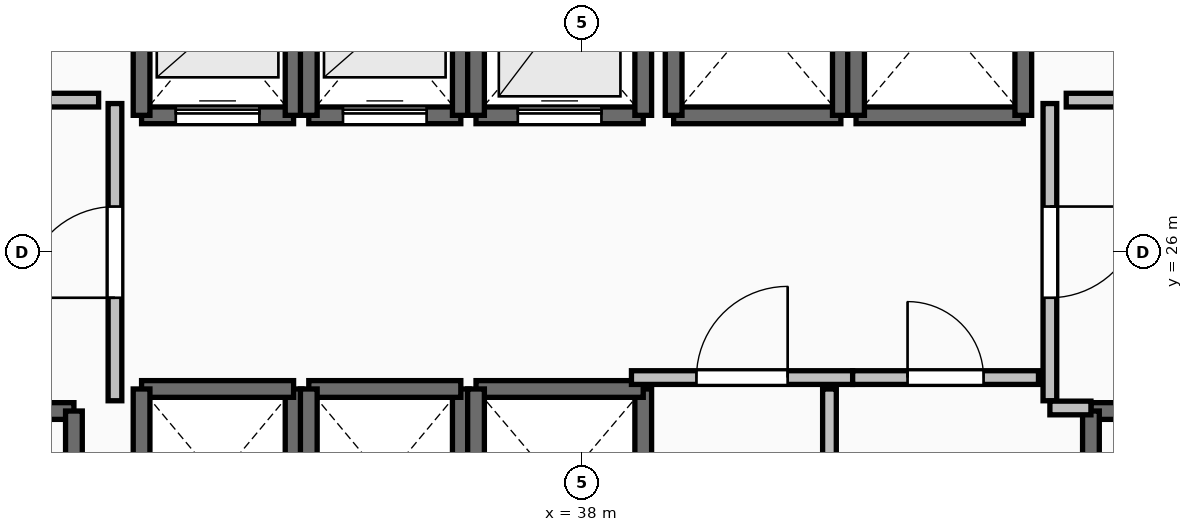
"""IFC4 building model, lengths in metres.
Left out: names, types, materials, properties, quantities, classifications, styles, units other than length and angle.
Written with IfcOpenShell. Run it as: python <this file> out.ifc"""

import sys

from ifc_helpers import new_model, si_unit, direction, frame, frame_2d, origin, place, context, subcontext, project, spatial, rectangle, extrude, element, fill, save


model = new_model("IFC4")
c1 = context("Model", 3, precision=1e-05, world=origin(), true_north=direction((0.0, 1.0)))
c2 = subcontext(c1, "Body", "Model", "MODEL_VIEW")
j1 = project(units=[si_unit("LENGTHUNIT", "METRE"), si_unit("PLANEANGLEUNIT", "RADIAN")], contexts=[c1])
p1 = place(None, origin())
s1 = spatial("IfcSite", under=j1, at=p1, CompositionType="ELEMENT")
p2 = place(p1, origin())
s2 = spatial("IfcBuilding", under=s1, at=p2, CompositionType="ELEMENT")
p3 = place(p2, frame((0.0, 0.0, 9.6)))
s3 = spatial("IfcBuildingStorey", under=s2, at=p3, CompositionType="ELEMENT", Elevation=9.6)
p4 = place(p3, frame((27.94, 23.91, 0.0), z_axis=(0.0, 0.0, 1.0), x_axis=(1.0, 0.0, 0.0)))
e1 = element("IfcWall", 1, at=p4, inside=s3, PredefinedType="SOLIDWALL", context=c2, shape_type="SweptSolid", body=[
    extrude(rectangle(XDim=3.37, YDim=0.22, at=frame_2d((1.685, 0.0))), origin(), (0.0, 0.0, 1.0), 4.48),
])
p5 = place(p4, frame((1.135, 0.0, 0.0)))
e2 = element("IfcOpeningElement", 2, at=p5, cuts=e1, PredefinedType="OPENING", context=c2, shape_type="SweptSolid", body=[
    extrude(rectangle(XDim=1.1, YDim=2.15, at=frame_2d((0.55, 1.075))), frame((0.0, 0.125, 0.0), z_axis=(0.0, -1.0, 0.0), x_axis=(1.0, 0.0, 0.0)), (0.0, 0.0, 1.0), 0.25),
])
p6 = place(p3, frame((31.31, 23.91, 0.0), z_axis=(0.0, 0.0, 1.0), x_axis=(0.0, -1.0, 0.0)))
e3 = element("IfcWall", 3, at=p6, inside=s3, PredefinedType="SOLIDWALL", context=c2, shape_type="SweptSolid", body=[
    extrude(rectangle(XDim=7.42, YDim=0.22, at=frame_2d((3.71, 0.0))), origin(), (0.0, 0.0, 1.0), 4.48),
])
p7 = place(p3, frame((44.69, 23.91, 0.0), z_axis=(0.0, 0.0, 1.0), x_axis=(1.0, 0.0, 0.0)))
e4 = element("IfcWall", 4, at=p7, inside=s3, PredefinedType="SOLIDWALL", context=c2, shape_type="SweptSolid", body=[
    extrude(rectangle(XDim=3.37, YDim=0.22, at=frame_2d((1.685, 0.0))), origin(), (0.0, 0.0, 1.0), 4.48),
])
p8 = place(p7, frame((1.135, 0.0, 0.0)))
e5 = element("IfcOpeningElement", 5, at=p8, cuts=e4, PredefinedType="OPENING", context=c2, shape_type="SweptSolid", body=[
    extrude(rectangle(XDim=1.1, YDim=2.15, at=frame_2d((0.55, 1.075))), frame((0.0, 0.125, 0.0), z_axis=(0.0, -1.0, 0.0), x_axis=(1.0, 0.0, 0.0)), (0.0, 0.0, 1.0), 0.25),
])
p9 = place(p3, frame((44.69, 16.49, 0.0), z_axis=(0.0, 0.0, 1.0), x_axis=(0.0, 1.0, 0.0)))
e6 = element("IfcWall", 6, at=p9, inside=s3, PredefinedType="SOLIDWALL", context=c2, shape_type="SweptSolid", body=[
    extrude(rectangle(XDim=7.42, YDim=0.22, at=frame_2d((3.71, 0.0))), origin(), (0.0, 0.0, 1.0), 4.48),
])
p10 = place(p3, frame((32.2, 27.8, 0.0), z_axis=(0.0, 0.0, 1.0), x_axis=(1.0, 0.0, 0.0)))
e7 = element("IfcWall", 7, at=p10, inside=s3, PredefinedType="SOLIDWALL", context=c2, shape_type="SweptSolid", body=[
    extrude(rectangle(XDim=2.0, YDim=0.22, at=frame_2d((1.0, 0.0))), origin(), (0.0, 0.0, 1.0), 4.48),
])
p11 = place(p10, frame((0.45, 0.0, 0.0)))
e8 = element("IfcOpeningElement", 8, at=p11, cuts=e7, PredefinedType="OPENING", context=c2, shape_type="SweptSolid", body=[
    extrude(rectangle(XDim=1.1, YDim=2.2, at=frame_2d((0.55, 1.1))), frame((0.0, 0.125, 0.0), z_axis=(0.0, -1.0, 0.0), x_axis=(1.0, 0.0, 0.0)), (0.0, 0.0, 1.0), 0.25),
])
for number, where, z_axis, x_axis in (
    (9, (34.2, 27.8, 0.0), (0.0, 0.0, 1.0), (0.0, 1.0, 0.0)),
    (10, (32.2, 30.2, 0.0), (0.0, 0.0, 1.0), (0.0, -1.0, 0.0)),
):
    element("IfcWall", number, at=place(p3, frame(where, z_axis=z_axis, x_axis=x_axis)), inside=s3, PredefinedType="SOLIDWALL", context=c2, shape_type="SweptSolid", body=[
        extrude(rectangle(XDim=2.4, YDim=0.22, at=frame_2d((1.2, 0.0))), origin(), (0.0, 0.0, 1.0), 4.48),
    ])
p12 = place(p3, frame((34.4, 27.8, 0.0), z_axis=(0.0, 0.0, 1.0), x_axis=(1.0, 0.0, 0.0)))
e11 = element("IfcWall", 11, at=p12, inside=s3, PredefinedType="SOLIDWALL", context=c2, shape_type="SweptSolid", body=[
    extrude(rectangle(XDim=2.0, YDim=0.22, at=frame_2d((1.0, 0.0))), origin(), (0.0, 0.0, 1.0), 4.48),
])
p13 = place(p12, frame((0.45, 0.0, 0.0)))
e12 = element("IfcOpeningElement", 12, at=p13, cuts=e11, PredefinedType="OPENING", context=c2, shape_type="SweptSolid", body=[
    extrude(rectangle(XDim=1.1, YDim=2.2, at=frame_2d((0.55, 1.1))), frame((0.0, 0.125, 0.0), z_axis=(0.0, -1.0, 0.0), x_axis=(1.0, 0.0, 0.0)), (0.0, 0.0, 1.0), 0.25),
])
for number, where, z_axis, x_axis in (
    (13, (36.4, 27.8, 0.0), (0.0, 0.0, 1.0), (0.0, 1.0, 0.0)),
    (14, (34.4, 30.2, 0.0), (0.0, 0.0, 1.0), (0.0, -1.0, 0.0)),
):
    element("IfcWall", number, at=place(p3, frame(where, z_axis=z_axis, x_axis=x_axis)), inside=s3, PredefinedType="SOLIDWALL", context=c2, shape_type="SweptSolid", body=[
        extrude(rectangle(XDim=2.4, YDim=0.22, at=frame_2d((1.2, 0.0))), origin(), (0.0, 0.0, 1.0), 4.48),
    ])
p14 = place(p3, frame((36.6, 27.8, 0.0), z_axis=(0.0, 0.0, 1.0), x_axis=(1.0, 0.0, 0.0)))
e15 = element("IfcWall", 15, at=p14, inside=s3, PredefinedType="SOLIDWALL", context=c2, shape_type="SweptSolid", body=[
    extrude(rectangle(XDim=2.2, YDim=0.22, at=frame_2d((1.1, 0.0))), origin(), (0.0, 0.0, 1.0), 4.48),
])
p15 = place(p14, frame((0.55, 0.0, 0.0)))
e16 = element("IfcOpeningElement", 16, at=p15, cuts=e15, PredefinedType="OPENING", context=c2, shape_type="SweptSolid", body=[
    extrude(rectangle(XDim=1.1, YDim=2.2, at=frame_2d((0.55, 1.1))), frame((0.0, 0.125, 0.0), z_axis=(0.0, -1.0, 0.0), x_axis=(1.0, 0.0, 0.0)), (0.0, 0.0, 1.0), 0.25),
])
for number, where, z_axis, x_axis in (
    (17, (38.8, 27.8, 0.0), (0.0, 0.0, 1.0), (0.0, 1.0, 0.0)),
    (18, (36.6, 30.4, 0.0), (0.0, 0.0, 1.0), (0.0, -1.0, 0.0)),
):
    element("IfcWall", number, at=place(p3, frame(where, z_axis=z_axis, x_axis=x_axis)), inside=s3, PredefinedType="SOLIDWALL", context=c2, shape_type="SweptSolid", body=[
        extrude(rectangle(XDim=2.6, YDim=0.22, at=frame_2d((1.3, 0.0))), origin(), (0.0, 0.0, 1.0), 4.48),
    ])
p16 = place(p3, frame((34.2, 21.8, 0.0), z_axis=(0.0, 0.0, 1.0), x_axis=(0.0, 1.0, 0.0)))
e19 = element("IfcWall", 19, at=p16, inside=s3, PredefinedType="SOLIDWALL", context=c2, shape_type="SweptSolid", body=[
    extrude(rectangle(XDim=2.4, YDim=0.22, at=frame_2d((1.2, 0.0))), origin(), (0.0, 0.0, 1.0), 4.48),
])
p17 = place(p3, frame((34.2, 24.2, 0.0), z_axis=(0.0, 0.0, 1.0), x_axis=(-1.0, 0.0, 0.0)))
e20 = element("IfcWall", 20, at=p17, inside=s3, PredefinedType="SOLIDWALL", context=c2, shape_type="SweptSolid", body=[
    extrude(rectangle(XDim=2.0, YDim=0.22, at=frame_2d((1.0, 0.0))), origin(), (0.0, 0.0, 1.0), 4.48),
])
for number, where, z_axis, x_axis in (
    (21, (32.2, 24.2, 0.0), (0.0, 0.0, 1.0), (0.0, -1.0, 0.0)),
    (22, (36.4, 21.8, 0.0), (0.0, 0.0, 1.0), (0.0, 1.0, 0.0)),
):
    element("IfcWall", number, at=place(p3, frame(where, z_axis=z_axis, x_axis=x_axis)), inside=s3, PredefinedType="SOLIDWALL", context=c2, shape_type="SweptSolid", body=[
        extrude(rectangle(XDim=2.4, YDim=0.22, at=frame_2d((1.2, 0.0))), origin(), (0.0, 0.0, 1.0), 4.48),
    ])
p18 = place(p3, frame((36.4, 24.2, 0.0), z_axis=(0.0, 0.0, 1.0), x_axis=(-1.0, 0.0, 0.0)))
e23 = element("IfcWall", 23, at=p18, inside=s3, PredefinedType="SOLIDWALL", context=c2, shape_type="SweptSolid", body=[
    extrude(rectangle(XDim=2.0, YDim=0.22, at=frame_2d((1.0, 0.0))), origin(), (0.0, 0.0, 1.0), 4.48),
])
p19 = place(p3, frame((34.4, 24.2, 0.0), z_axis=(0.0, 0.0, 1.0), x_axis=(0.0, -1.0, 0.0)))
e24 = element("IfcWall", 24, at=p19, inside=s3, PredefinedType="SOLIDWALL", context=c2, shape_type="SweptSolid", body=[
    extrude(rectangle(XDim=2.4, YDim=0.22, at=frame_2d((1.2, 0.0))), origin(), (0.0, 0.0, 1.0), 4.48),
])
p20 = place(p3, frame((38.8, 21.6, 0.0), z_axis=(0.0, 0.0, 1.0), x_axis=(0.0, 1.0, 0.0)))
e25 = element("IfcWall", 25, at=p20, inside=s3, PredefinedType="SOLIDWALL", context=c2, shape_type="SweptSolid", body=[
    extrude(rectangle(XDim=2.6, YDim=0.22, at=frame_2d((1.3, 0.0))), origin(), (0.0, 0.0, 1.0), 4.48),
])
p21 = place(p3, frame((38.8, 24.2, 0.0), z_axis=(0.0, 0.0, 1.0), x_axis=(-1.0, 0.0, 0.0)))
e26 = element("IfcWall", 26, at=p21, inside=s3, PredefinedType="SOLIDWALL", context=c2, shape_type="SweptSolid", body=[
    extrude(rectangle(XDim=2.2, YDim=0.22, at=frame_2d((1.1, 0.0))), origin(), (0.0, 0.0, 1.0), 4.48),
])
p22 = place(p3, frame((36.6, 24.2, 0.0), z_axis=(0.0, 0.0, 1.0), x_axis=(0.0, -1.0, 0.0)))
e27 = element("IfcWall", 27, at=p22, inside=s3, PredefinedType="SOLIDWALL", context=c2, shape_type="SweptSolid", body=[
    extrude(rectangle(XDim=2.6, YDim=0.22, at=frame_2d((1.3, 0.0))), origin(), (0.0, 0.0, 1.0), 4.48),
])
p23 = place(p3, frame((39.2, 27.8, 0.0), z_axis=(0.0, 0.0, 1.0), x_axis=(1.0, 0.0, 0.0)))
e28 = element("IfcWall", 28, at=p23, inside=s3, PredefinedType="SOLIDWALL", context=c2, shape_type="SweptSolid", body=[
    extrude(rectangle(XDim=2.2, YDim=0.22, at=frame_2d((1.1, 0.0))), origin(), (0.0, 0.0, 1.0), 4.48),
])
for number, where, z_axis, x_axis in (
    (29, (41.4, 27.8, 0.0), (0.0, 0.0, 1.0), (0.0, 1.0, 0.0)),
    (30, (39.2, 30.4, 0.0), (0.0, 0.0, 1.0), (0.0, -1.0, 0.0)),
):
    element("IfcWall", number, at=place(p3, frame(where, z_axis=z_axis, x_axis=x_axis)), inside=s3, PredefinedType="SOLIDWALL", context=c2, shape_type="SweptSolid", body=[
        extrude(rectangle(XDim=2.6, YDim=0.22, at=frame_2d((1.3, 0.0))), origin(), (0.0, 0.0, 1.0), 4.48),
    ])
p24 = place(p3, frame((41.6, 27.8, 0.0), z_axis=(0.0, 0.0, 1.0), x_axis=(1.0, 0.0, 0.0)))
e31 = element("IfcWall", 31, at=p24, inside=s3, PredefinedType="SOLIDWALL", context=c2, shape_type="SweptSolid", body=[
    extrude(rectangle(XDim=2.2, YDim=0.22, at=frame_2d((1.1, 0.0))), origin(), (0.0, 0.0, 1.0), 4.48),
])
for number, where, z_axis, x_axis in (
    (32, (43.8, 27.8, 0.0), (0.0, 0.0, 1.0), (0.0, 1.0, 0.0)),
    (33, (41.6, 30.4, 0.0), (0.0, 0.0, 1.0), (0.0, -1.0, 0.0)),
):
    element("IfcWall", number, at=place(p3, frame(where, z_axis=z_axis, x_axis=x_axis)), inside=s3, PredefinedType="SOLIDWALL", context=c2, shape_type="SweptSolid", body=[
        extrude(rectangle(XDim=2.6, YDim=0.22, at=frame_2d((1.3, 0.0))), origin(), (0.0, 0.0, 1.0), 4.48),
    ])
p25 = place(p3, frame((31.85, 24.045, 0.0), z_axis=(0.0, 0.0, 1.0), x_axis=(0.0, 1.0, 0.0)))
e34 = element("IfcWall", 34, at=p25, inside=s3, PredefinedType="PARTITIONING", context=c2, shape_type="SweptSolid", body=[
    extrude(rectangle(XDim=3.91, YDim=0.18, at=frame_2d((1.955, 0.0))), origin(), (0.0, 0.0, 1.0), 4.48),
])
p26 = place(p25, frame((1.355, 0.0, 0.0)))
e35 = element("IfcOpeningElement", 35, at=p26, cuts=e34, PredefinedType="OPENING", context=c2, shape_type="SweptSolid", body=[
    extrude(rectangle(XDim=1.2, YDim=2.15, at=frame_2d((0.6, 1.075))), frame((0.0, 0.105, 0.0), z_axis=(0.0, -1.0, 0.0), x_axis=(1.0, 0.0, 0.0)), (0.0, 0.0, 1.0), 0.21),
])
p27 = place(p3, frame((44.15, 27.955, 0.0), z_axis=(0.0, 0.0, 1.0), x_axis=(0.0, -1.0, 0.0)))
e36 = element("IfcWall", 36, at=p27, inside=s3, PredefinedType="PARTITIONING", context=c2, shape_type="SweptSolid", body=[
    extrude(rectangle(XDim=3.91, YDim=0.18, at=frame_2d((1.955, 0.0))), origin(), (0.0, 0.0, 1.0), 4.48),
])
p28 = place(p27, frame((1.355, 0.0, 0.0)))
e37 = element("IfcOpeningElement", 37, at=p28, cuts=e36, PredefinedType="OPENING", context=c2, shape_type="SweptSolid", body=[
    extrude(rectangle(XDim=1.2, YDim=2.15, at=frame_2d((0.6, 1.075))), frame((0.0, 0.105, 0.0), z_axis=(0.0, -1.0, 0.0), x_axis=(1.0, 0.0, 0.0)), (0.0, 0.0, 1.0), 0.21),
])
p29 = place(p3, frame((44.15, 23.95, 0.0), z_axis=(0.0, 0.0, 1.0), x_axis=(1.0, 0.0, 0.0)))
e38 = element("IfcWall", 38, at=p29, inside=s3, PredefinedType="PARTITIONING", context=c2, shape_type="SweptSolid", body=[
    extrude(rectangle(XDim=0.54, YDim=0.18, at=frame_2d((0.27, 0.0))), origin(), (0.0, 0.0, 1.0), 4.48),
])
p30 = place(p3, frame((38.645, 24.35, 0.0), z_axis=(0.0, 0.0, 1.0), x_axis=(1.0, 0.0, 0.0)))
e39 = element("IfcWall", 39, at=p30, inside=s3, PredefinedType="PARTITIONING", context=c2, shape_type="SweptSolid", body=[
    extrude(rectangle(XDim=2.91, YDim=0.18, at=frame_2d((1.455, 0.0))), origin(), (0.0, 0.0, 1.0), 4.48),
])
p31 = place(p30, frame((0.855, 0.0, 0.0)))
e40 = element("IfcOpeningElement", 40, at=p31, cuts=e39, PredefinedType="OPENING", context=c2, shape_type="SweptSolid", body=[
    extrude(rectangle(XDim=1.2, YDim=2.15, at=frame_2d((0.6, 1.075))), frame((0.0, 0.105, 0.0), z_axis=(0.0, -1.0, 0.0), x_axis=(1.0, 0.0, 0.0)), (0.0, 0.0, 1.0), 0.21),
])
p32 = place(p3, frame((41.555, 24.35, 0.0), z_axis=(0.0, 0.0, 1.0), x_axis=(1.0, 0.0, 0.0)))
e41 = element("IfcWall", 41, at=p32, inside=s3, PredefinedType="PARTITIONING", context=c2, shape_type="SweptSolid", body=[
    extrude(rectangle(XDim=2.445, YDim=0.18, at=frame_2d((1.223, 0.0))), origin(), (0.0, 0.0, 1.0), 4.48),
])
p33 = place(p32, frame((0.722, 0.0, 0.0)))
e42 = element("IfcOpeningElement", 42, at=p33, cuts=e41, PredefinedType="OPENING", context=c2, shape_type="SweptSolid", body=[
    extrude(rectangle(XDim=1.0, YDim=2.15, at=frame_2d((0.5, 1.075))), frame((0.0, 0.105, 0.0), z_axis=(0.0, -1.0, 0.0), x_axis=(1.0, 0.0, 0.0)), (0.0, 0.0, 1.0), 0.21),
])
p34 = place(p3, frame((41.25, 20.305, 0.0), z_axis=(0.0, 0.0, 1.0), x_axis=(0.0, 1.0, 0.0)))
e43 = element("IfcWall", 43, at=p34, inside=s3, PredefinedType="PARTITIONING", context=c2, shape_type="SweptSolid", body=[
    extrude(rectangle(XDim=3.895, YDim=0.18, at=frame_2d((1.948, 0.0))), origin(), (0.0, 0.0, 1.0), 4.48),
])
p35 = place(p34, frame((1.448, 0.0, 0.0)))
e44 = element("IfcOpeningElement", 44, at=p35, cuts=e43, PredefinedType="OPENING", context=c2, shape_type="SweptSolid", body=[
    extrude(rectangle(XDim=1.0, YDim=2.15, at=frame_2d((0.5, 1.075))), frame((0.0, 0.105, 0.0), z_axis=(0.0, -1.0, 0.0), x_axis=(1.0, 0.0, 0.0)), (0.0, 0.0, 1.0), 0.21),
])
for number, where, z_axis, x_axis in (
    (45, (31.635, 28.0, 0.0), (0.0, 0.0, 1.0), (-1.0, 0.0, 0.0)),
    (46, (45.28, 28.0, 0.0), (0.0, 0.0, 1.0), (-1.0, 0.0, 0.0)),
):
    element("IfcWall", number, at=place(p3, frame(where, z_axis=z_axis, x_axis=x_axis)), inside=s3, PredefinedType="PARTITIONING", context=c2, shape_type="SweptSolid", body=[
        extrude(rectangle(XDim=0.915, YDim=0.18, at=frame_2d((0.458, 0.0))), origin(), (0.0, 0.0, 1.0), 4.48),
    ])
p36 = place(p11, origin())
e47 = element("IfcDoor", 47, at=p36, inside=s3, OperationType="SLIDING_TO_LEFT", PredefinedType="DOOR", context=c2, shape_type="SweptSolid", body=[
    extrude(rectangle(XDim=1.1, YDim=2.2, at=frame_2d((0.55, 1.1))), frame((0.0, 0.025, 0.0), z_axis=(0.0, -1.0, 0.0), x_axis=(1.0, 0.0, 0.0)), (0.0, 0.0, 1.0), 0.05),
])
fill(e8, e47)
p37 = place(p13, origin())
e48 = element("IfcDoor", 48, at=p37, inside=s3, OperationType="SLIDING_TO_LEFT", PredefinedType="DOOR", context=c2, shape_type="SweptSolid", body=[
    extrude(rectangle(XDim=1.1, YDim=2.2, at=frame_2d((0.55, 1.1))), frame((0.0, 0.025, 0.0), z_axis=(0.0, -1.0, 0.0), x_axis=(1.0, 0.0, 0.0)), (0.0, 0.0, 1.0), 0.05),
])
fill(e12, e48)
p38 = place(p15, origin())
e49 = element("IfcDoor", 49, at=p38, inside=s3, OperationType="SLIDING_TO_LEFT", PredefinedType="DOOR", context=c2, shape_type="SweptSolid", body=[
    extrude(rectangle(XDim=1.1, YDim=2.2, at=frame_2d((0.55, 1.1))), frame((0.0, 0.025, 0.0), z_axis=(0.0, -1.0, 0.0), x_axis=(1.0, 0.0, 0.0)), (0.0, 0.0, 1.0), 0.05),
])
fill(e16, e49)
p39 = place(p26, origin())
e50 = element("IfcDoor", 50, at=p39, inside=s3, OperationType="SINGLE_SWING_LEFT", PredefinedType="DOOR", context=c2, shape_type="SweptSolid", body=[
    extrude(rectangle(XDim=1.2, YDim=2.15, at=frame_2d((0.6, 1.075))), frame((0.0, 0.025, 0.0), z_axis=(0.0, -1.0, 0.0), x_axis=(1.0, 0.0, 0.0)), (0.0, 0.0, 1.0), 0.05),
])
fill(e35, e50)
p40 = place(p28, origin())
e51 = element("IfcDoor", 51, at=p40, inside=s3, OperationType="SINGLE_SWING_LEFT", PredefinedType="DOOR", context=c2, shape_type="SweptSolid", body=[
    extrude(rectangle(XDim=1.2, YDim=2.15, at=frame_2d((0.6, 1.075))), frame((0.0, 0.025, 0.0), z_axis=(0.0, -1.0, 0.0), x_axis=(1.0, 0.0, 0.0)), (0.0, 0.0, 1.0), 0.05),
])
fill(e37, e51)
p41 = place(p31, origin())
e52 = element("IfcDoor", 52, at=p41, inside=s3, OperationType="SINGLE_SWING_RIGHT", PredefinedType="DOOR", context=c2, shape_type="SweptSolid", body=[
    extrude(rectangle(XDim=1.2, YDim=2.15, at=frame_2d((0.6, 1.075))), frame((0.0, 0.025, 0.0), z_axis=(0.0, -1.0, 0.0), x_axis=(1.0, 0.0, 0.0)), (0.0, 0.0, 1.0), 0.05),
])
fill(e40, e52)
p42 = place(p33, origin())
e53 = element("IfcDoor", 53, at=p42, inside=s3, OperationType="SINGLE_SWING_LEFT", PredefinedType="DOOR", context=c2, shape_type="SweptSolid", body=[
    extrude(rectangle(XDim=1.0, YDim=2.15, at=frame_2d((0.5, 1.075))), frame((0.0, 0.025, 0.0), z_axis=(0.0, -1.0, 0.0), x_axis=(1.0, 0.0, 0.0)), (0.0, 0.0, 1.0), 0.05),
])
fill(e42, e53)
save(model, sys.argv[1])
